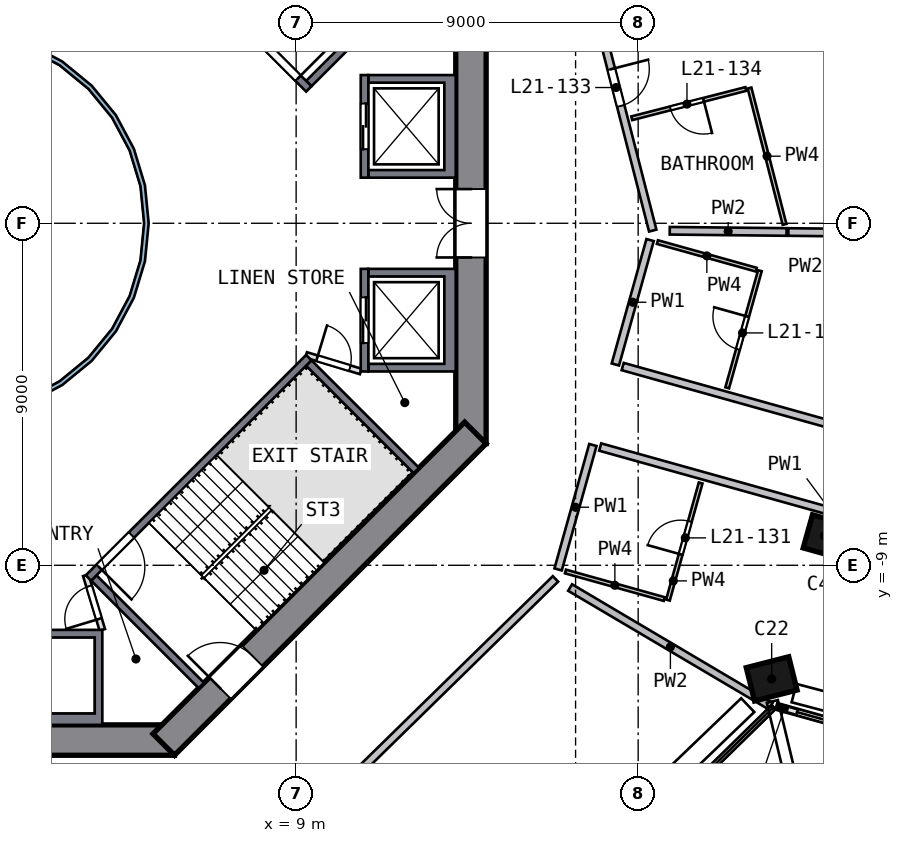
"""IFC4 building model, lengths in metres.
Left out: names, types, materials, properties, quantities, classifications, styles, units other than length and angle.
Written with IfcOpenShell. Run it as: python <this file> out.ifc"""

import sys

from ifc_helpers import new_model, si_unit, direction, frame, frame_2d, origin, origin_2d, place, context, subcontext, project, spatial, polyline, rectangle, outline, extrude, element, fill, save


model = new_model("IFC4")
c1 = context("Model", 3, precision=1e-05, world=origin(), true_north=direction((0.0, 1.0)))
c2 = subcontext(c1, "Body", "Model", "MODEL_VIEW")
j1 = project(units=[si_unit("LENGTHUNIT", "METRE"), si_unit("PLANEANGLEUNIT", "RADIAN")], contexts=[c1])
p1 = place(None, origin())
s1 = spatial("IfcSite", under=j1, at=p1, CompositionType="ELEMENT")
p2 = place(p1, origin())
s2 = spatial("IfcBuilding", under=s1, at=p2, CompositionType="ELEMENT")
p3 = place(p2, frame((0.0, 0.0, 93.0)))
s3 = spatial("IfcBuildingStorey", under=s2, at=p3, CompositionType="ELEMENT", Elevation=93.0)
p4 = place(p3, frame((21.444, -12.113, 0.0), z_axis=(0.056777694, 0.102458276, 0.9931156), x_axis=(-0.96720596, -0.24101204, 0.080161264)))
e1 = element("IfcColumn", 1, at=p4, inside=s3, PredefinedType="COLUMN", context=c2, shape_type="SweptSolid", body=[
    extrude(rectangle(XDim=1.15, YDim=0.9, at=origin_2d()), origin(), (0.0, 0.0, 1.0), 3.212),
])
p5 = place(p3, frame((22.852, -8.36, 0.0), z_axis=(0.038846363, 0.109013082, 0.993280981), x_axis=(0.962880734, -0.269807256, -0.008045955)))
e2 = element("IfcColumn", 2, at=p5, inside=s3, PredefinedType="COLUMN", context=c2, shape_type="SweptSolid", body=[
    extrude(rectangle(XDim=0.9, YDim=0.9, at=origin_2d()), origin(), (0.0, 0.0, 1.0), 3.211),
])
p6 = place(p3, frame((13.6, -5.799, 0.0), z_axis=(0.0, 0.0, 1.0), x_axis=(0.0, 1.0, 0.0)))
e3 = element("IfcWall", 3, at=p6, inside=s3, PredefinedType="SHEAR", context=c2, shape_type="SweptSolid", body=[
    extrude(rectangle(XDim=11.598, YDim=0.8, at=frame_2d((5.799, 0.0))), origin(), (0.0, 0.0, 1.0), 3.5),
])
p7 = place(p6, frame((4.899, 0.0, 0.0)))
e4 = element("IfcOpeningElement", 4, at=p7, cuts=e3, PredefinedType="OPENING", context=c2, shape_type="SweptSolid", body=[
    extrude(rectangle(XDim=1.8, YDim=2.1, at=frame_2d((0.9, 1.05))), frame((0.0, 0.41, 0.0), z_axis=(0.0, -1.0, 0.0), x_axis=(1.0, 0.0, 0.0)), (0.0, 0.0, 1.0), 0.82),
])
p8 = place(p3, frame((-5.799, -13.6, 0.0), z_axis=(0.0, 0.0, 1.0), x_axis=(1.0, 0.0, 0.0)))
e5 = element("IfcWall", 5, at=p8, inside=s3, PredefinedType="SHEAR", context=c2, shape_type="SweptSolid", body=[
    extrude(rectangle(XDim=11.598, YDim=0.8, at=frame_2d((5.799, 0.0))), origin(), (0.0, 0.0, 1.0), 3.5),
])
p9 = place(p8, frame((4.899, 0.0, 0.0)))
e6 = element("IfcOpeningElement", 6, at=p9, cuts=e5, PredefinedType="OPENING", context=c2, shape_type="SweptSolid", body=[
    extrude(rectangle(XDim=1.8, YDim=2.1, at=frame_2d((0.9, 1.05))), frame((0.0, 0.41, 0.0), z_axis=(0.0, -1.0, 0.0), x_axis=(1.0, 0.0, 0.0)), (0.0, 0.0, 1.0), 0.82),
])
p10 = place(p3, frame((5.516, -13.717, 0.0), z_axis=(0.0, 0.0, 1.0), x_axis=(0.707106781, 0.707106781, 0.0)))
e7 = element("IfcWall", 7, at=p10, inside=s3, PredefinedType="SHEAR", context=c2, shape_type="SweptSolid", body=[
    extrude(rectangle(XDim=11.598, YDim=0.8, at=frame_2d((5.799, 0.0))), origin(), (0.0, 0.0, 1.0), 3.5),
])
p11 = place(p10, frame((2.099, 0.0, 0.0)))
e8 = element("IfcOpeningElement", 8, at=p11, cuts=e7, PredefinedType="OPENING", context=c2, shape_type="SweptSolid", body=[
    extrude(rectangle(XDim=1.2, YDim=2.1, at=frame_2d((0.6, 1.05))), frame((0.0, 0.41, 0.0), z_axis=(0.0, -1.0, 0.0), x_axis=(1.0, 0.0, 0.0)), (0.0, 0.0, 1.0), 0.82),
])
p12 = place(p3, frame((21.704, -12.731, 0.0), z_axis=(0.0, 0.0, 1.0), x_axis=(0.963162375, -0.268920509, 0.0)))
e9 = element("IfcWall", 9, at=p12, inside=s3, PredefinedType="SOLIDWALL", context=c2, shape_type="SweptSolid", body=[
    extrude(rectangle(XDim=3.294, YDim=0.15, at=frame_2d((1.647, 0.0))), origin(), (0.0, 0.0, 1.0), 2.425),
])
p13 = place(p12, frame((0.494, 0.0, 0.0)))
e10 = element("IfcOpeningElement", 10, at=p13, cuts=e9, PredefinedType="OPENING", context=c2, shape_type="SweptSolid", body=[
    extrude(rectangle(XDim=2.4, YDim=2.4, at=frame_2d((1.2, 1.2))), frame((0.0, 0.085, 0.0), z_axis=(0.0, -1.0, 0.0), x_axis=(1.0, 0.0, 0.0)), (0.0, 0.0, 1.0), 0.17),
])
p14 = place(p3, origin())
e11 = element("IfcWall", 11, at=p14, inside=s3, PredefinedType="SOLIDWALL", context=c2, shape_type="SweptSolid", body=[
    extrude(outline(polyline([(13.2, -3.9), (10.9, -3.9), (10.9, -3.7), (12.9, -3.7), (12.9, -1.4), (10.9, -1.4), (10.9, -1.2), (13.2, -1.2), (13.2, -3.9)])), origin(), (0.0, 0.0, 1.0), 3.19),
])
p15 = place(p3, frame((10.8, -1.2, 0.0), z_axis=(0.0, 0.0, 1.0), x_axis=(0.0, -1.0, 0.0)))
e12 = element("IfcWall", 12, at=p15, inside=s3, PredefinedType="SOLIDWALL", context=c2, shape_type="SweptSolid", body=[
    extrude(rectangle(XDim=2.7, YDim=0.2, at=frame_2d((1.35, 0.0))), origin(), (0.0, 0.0, 1.0), 3.19),
])
p16 = place(p15, frame((0.75, 0.0, 0.0)))
e13 = element("IfcOpeningElement", 13, at=p16, cuts=e12, PredefinedType="OPENING", context=c2, shape_type="SweptSolid", body=[
    extrude(rectangle(XDim=1.2, YDim=2.1, at=frame_2d((0.6, 1.05))), frame((0.0, 0.11, 0.0), z_axis=(0.0, -1.0, 0.0), x_axis=(1.0, 0.0, 0.0)), (0.0, 0.0, 1.0), 0.22),
])
p17 = place(p3, origin())
e14 = element("IfcWall", 14, at=p17, inside=s3, PredefinedType="SOLIDWALL", context=c2, shape_type="SweptSolid", body=[
    extrude(outline(polyline([(13.2, 3.9), (13.2, 1.2), (10.9, 1.2), (10.9, 1.4), (12.9, 1.4), (12.9, 3.7), (10.9, 3.7), (10.9, 3.9), (13.2, 3.9)])), origin(), (0.0, 0.0, 1.0), 3.19),
])
p18 = place(p3, frame((10.8, 1.2, 0.0), z_axis=(0.0, 0.0, 1.0), x_axis=(0.0, 1.0, 0.0)))
e15 = element("IfcWall", 15, at=p18, inside=s3, PredefinedType="SOLIDWALL", context=c2, shape_type="SweptSolid", body=[
    extrude(rectangle(XDim=2.7, YDim=0.2, at=frame_2d((1.35, 0.0))), origin(), (0.0, 0.0, 1.0), 3.19),
])
p19 = place(p18, frame((0.75, 0.0, 0.0)))
e16 = element("IfcOpeningElement", 16, at=p19, cuts=e15, PredefinedType="OPENING", context=c2, shape_type="SweptSolid", body=[
    extrude(rectangle(XDim=1.2, YDim=2.1, at=frame_2d((0.6, 1.05))), frame((0.0, 0.11, 0.0), z_axis=(0.0, -1.0, 0.0), x_axis=(1.0, 0.0, 0.0)), (0.0, 0.0, 1.0), 0.22),
])
p20 = place(p3, origin())
e17 = element("IfcWall", 17, at=p20, inside=s3, PredefinedType="SOLIDWALL", context=c2, shape_type="SweptSolid", body=[
    extrude(outline(polyline([(3.9, -10.7), (3.9, -13.2), (1.2, -13.2), (1.2, -10.7), (3.9, -10.7)]), holes=[polyline([(1.4, -12.9), (3.7, -12.9), (3.7, -10.9), (1.4, -10.9), (1.4, -12.9)])]), origin(), (0.0, 0.0, 1.0), 3.19),
])
p21 = place(p3, frame((3.535, 9.334, 0.0), z_axis=(0.0, 0.0, 1.0), x_axis=(0.707106781, -0.707106781, 0.0)))
e18 = element("IfcWall", 18, at=p21, inside=s3, PredefinedType="SOLIDWALL", context=c2, shape_type="SweptSolid", body=[
    extrude(rectangle(XDim=8.2, YDim=0.2, at=frame_2d((4.1, 0.0))), origin(), (0.0, 0.0, 1.0), 3.19),
])
p22 = place(p21, frame((6.6, 0.0, 0.0)))
e19 = element("IfcOpeningElement", 19, at=p22, cuts=e18, PredefinedType="OPENING", context=c2, shape_type="SweptSolid", body=[
    extrude(rectangle(XDim=1.2, YDim=2.1, at=frame_2d((0.6, 1.05))), frame((0.0, 0.11, 0.0), z_axis=(0.0, -1.0, 0.0), x_axis=(1.0, 0.0, 0.0)), (0.0, 0.0, 1.0), 0.22),
])
p23 = place(p3, frame((9.334, 3.677, 0.0), z_axis=(0.0, 0.0, 1.0), x_axis=(0.707106781, 0.707106781, 0.0)))
e20 = element("IfcWall", 20, at=p23, inside=s3, PredefinedType="SOLIDWALL", context=c2, shape_type="SweptSolid", body=[
    extrude(rectangle(XDim=4.0, YDim=0.2, at=frame_2d((2.0, 0.0))), origin(), (0.0, 0.0, 1.0), 3.19),
])
p24 = place(p3, frame((9.334, -3.535, 0.0), z_axis=(0.0, 0.0, 1.0), x_axis=(-0.707106781, -0.707106781, 0.0)))
e21 = element("IfcWall", 21, at=p24, inside=s3, PredefinedType="SOLIDWALL", context=c2, shape_type="SweptSolid", body=[
    extrude(rectangle(XDim=8.2, YDim=0.2, at=frame_2d((4.1, 0.0))), origin(), (0.0, 0.0, 1.0), 3.19),
])
p25 = place(p24, frame((6.6, 0.0, 0.0)))
e22 = element("IfcOpeningElement", 22, at=p25, cuts=e21, PredefinedType="OPENING", context=c2, shape_type="SweptSolid", body=[
    extrude(rectangle(XDim=1.2, YDim=2.1, at=frame_2d((0.6, 1.05))), frame((0.0, 0.11, 0.0), z_axis=(0.0, -1.0, 0.0), x_axis=(1.0, 0.0, 0.0)), (0.0, 0.0, 1.0), 0.22),
])
for number, where, z_axis, x_axis in (
    (23, (3.677, -9.334, 0.0), (0.0, 0.0, 1.0), (0.707, -0.707, 0.0)),
    (24, (9.334, -3.677, 0.0), (0.0, 0.0, 1.0), (0.707, -0.707, 0.0)),
):
    element("IfcWall", number, at=place(p3, frame(where, z_axis=z_axis, x_axis=x_axis)), inside=s3, PredefinedType="SOLIDWALL", context=c2, shape_type="SweptSolid", body=[
        extrude(rectangle(XDim=4.0, YDim=0.2, at=frame_2d((2.0, 0.0))), origin(), (0.0, 0.0, 1.0), 3.19),
    ])
p26 = place(p3, frame((3.9, -10.7, 0.0), z_axis=(0.0, 0.0, 1.0), x_axis=(-0.289808785, 0.957084567, 0.0)))
e25 = element("IfcWall", 25, at=p26, inside=s3, PredefinedType="PARTITIONING", context=c2, shape_type="SweptSolid", body=[
    extrude(rectangle(XDim=1.501, YDim=0.15, at=frame_2d((0.75, 0.0))), origin(), (0.0, 0.0, 1.0), 3.19),
])
p27 = place(p26, frame((0.301, 0.0, 0.0)))
e26 = element("IfcOpeningElement", 26, at=p27, cuts=e25, PredefinedType="OPENING", context=c2, shape_type="SweptSolid", body=[
    extrude(rectangle(XDim=0.9, YDim=2.1, at=frame_2d((0.45, 1.05))), frame((0.0, 0.085, 0.0), z_axis=(0.0, -1.0, 0.0), x_axis=(1.0, 0.0, 0.0)), (0.0, 0.0, 1.0), 0.17),
])
p28 = place(p3, frame((9.263, -3.465, 0.0), z_axis=(0.0, 0.0, 1.0), x_axis=(0.957084567, -0.289808785, 0.0)))
e27 = element("IfcWall", 27, at=p28, inside=s3, PredefinedType="PARTITIONING", context=c2, shape_type="SweptSolid", body=[
    extrude(rectangle(XDim=1.501, YDim=0.15, at=frame_2d((0.75, 0.0))), origin(), (0.0, 0.0, 1.0), 3.19),
])
p29 = place(p28, frame((0.301, 0.0, 0.0)))
e28 = element("IfcOpeningElement", 28, at=p29, cuts=e27, PredefinedType="OPENING", context=c2, shape_type="SweptSolid", body=[
    extrude(rectangle(XDim=0.9, YDim=2.1, at=frame_2d((0.45, 1.05))), frame((0.0, 0.085, 0.0), z_axis=(0.0, -1.0, 0.0), x_axis=(1.0, 0.0, 0.0)), (0.0, 0.0, 1.0), 0.17),
])
p30 = place(p3, origin())
e29 = element("IfcWall", 29, at=p30, inside=s3, PredefinedType="SOLIDWALL", context=c2, shape_type="SweptSolid", body=[
    extrude(outline(polyline([(5.021, -0.999), (4.73, -1.959), (4.257, -2.844), (3.62, -3.62), (2.844, -4.257), (1.959, -4.73), (0.999, -5.021), (0.0, -5.12), (-0.999, -5.021), (-1.959, -4.73), (-2.844, -4.257), (-3.62, -3.62), (-4.257, -2.844), (-4.73, -1.959), (-5.021, -0.999), (-5.12, 0.0), (-5.021, 0.999), (-4.73, 1.959), (-4.257, 2.844), (-3.62, 3.62), (-2.844, 4.257), (-1.959, 4.73), (-0.999, 5.021), (0.0, 5.12), (0.999, 5.021), (1.959, 4.73), (2.844, 4.257), (3.62, 3.62), (4.257, 2.844), (4.73, 1.959), (5.021, 0.999), (5.12, 0.0), (5.021, -0.999)]), holes=[polyline([(4.904, 0.976), (4.619, 1.913), (4.157, 2.778), (3.535, 3.535), (2.778, 4.157), (1.913, 4.619), (0.976, 4.904), (0.0, 5.0), (-0.976, 4.904), (-1.913, 4.619), (-2.778, 4.157), (-3.535, 3.535), (-4.157, 2.778), (-4.619, 1.913), (-4.904, 0.976), (-5.0, 0.0), (-4.904, -0.976), (-4.619, -1.913), (-4.157, -2.778), (-3.535, -3.535), (-2.778, -4.157), (-1.913, -4.619), (-0.976, -4.904), (0.0, -5.0), (0.976, -4.904), (1.913, -4.619), (2.778, -4.157), (3.535, -3.535), (4.157, -2.778), (4.619, -1.913), (4.904, -0.976), (5.0, 0.0), (4.904, 0.976)])]), origin(), (0.0, 0.0, 1.0), 3.19),
])
p31 = place(p3, frame((9.025, -16.017, 0.0), z_axis=(0.0, 0.0, 1.0), x_axis=(0.714482371, 0.699653444, 0.0)))
e30 = element("IfcWall", 30, at=p31, inside=s3, PredefinedType="SOLIDWALL", context=c2, shape_type="SweptSolid", body=[
    extrude(rectangle(XDim=9.516, YDim=0.2, at=frame_2d((4.758, 0.0))), origin(), (0.0, 0.0, 1.0), 3.19),
])
p32 = place(p3, frame((15.894, -9.11, 0.0), z_axis=(0.0, 0.0, 1.0), x_axis=(0.268902762, 0.963167329, 0.0)))
e31 = element("IfcWall", 31, at=p32, inside=s3, PredefinedType="SOLIDWALL", context=c2, shape_type="SweptSolid", body=[
    extrude(rectangle(XDim=3.4, YDim=0.2, at=frame_2d((1.7, 0.0))), origin(), (0.0, 0.0, 1.0), 3.19),
])
p33 = place(p3, frame((16.012, 9.044, 0.0), z_axis=(0.0, 0.0, 1.0), x_axis=(0.248687002, -0.968583902, 0.0)))
e32 = element("IfcWall", 32, at=p33, inside=s3, PredefinedType="SOLIDWALL", context=c2, shape_type="SweptSolid", body=[
    extrude(rectangle(XDim=9.536, YDim=0.2, at=frame_2d((4.768, 0.0))), origin(), (0.0, 0.0, 1.0), 3.19),
])
p34 = place(p33, frame((5.15, 0.0, 0.0)))
e33 = element("IfcOpeningElement", 33, at=p34, cuts=e32, PredefinedType="OPENING", context=c2, shape_type="SweptSolid", body=[
    extrude(rectangle(XDim=1.0, YDim=2.1, at=frame_2d((0.5, 1.05))), frame((0.0, 0.11, 0.0), z_axis=(0.0, -1.0, 0.0), x_axis=(1.0, 0.0, 0.0)), (0.0, 0.0, 1.0), 0.22),
])
p35 = place(p3, frame((17.4, -3.716, 0.0), z_axis=(0.0, 0.0, 1.0), x_axis=(0.26892136, 0.963162137, 0.0)))
e34 = element("IfcWall", 34, at=p35, inside=s3, PredefinedType="SOLIDWALL", context=c2, shape_type="SweptSolid", body=[
    extrude(rectangle(XDim=3.4, YDim=0.2, at=frame_2d((1.7, 0.0))), origin(), (0.0, 0.0, 1.0), 3.19),
])
p36 = place(p3, frame((17.001, -5.889, 0.0), z_axis=(0.0, 0.0, 1.0), x_axis=(0.963163806, -0.268915381, 0.0)))
e35 = element("IfcWall", 35, at=p36, inside=s3, PredefinedType="SOLIDWALL", context=c2, shape_type="SweptSolid", body=[
    extrude(rectangle(XDim=12.624, YDim=0.2, at=frame_2d((6.312, 0.0))), origin(), (0.0, 0.0, 1.0), 3.19),
])
p37 = place(p3, frame((29.752, -7.165, 0.0), z_axis=(0.0, 0.0, 1.0), x_axis=(-0.963165205, 0.268910372, 0.0)))
e36 = element("IfcWall", 36, at=p37, inside=s3, PredefinedType="SOLIDWALL", context=c2, shape_type="SweptSolid", body=[
    extrude(rectangle(XDim=12.624, YDim=0.2, at=frame_2d((6.312, 0.0))), origin(), (0.0, 0.0, 1.0), 3.19),
])
p38 = place(p3, frame((16.209, -9.586, 0.0), z_axis=(0.0, 0.0, 1.0), x_axis=(0.860732275, -0.509057906, 0.0)))
e37 = element("IfcWall", 37, at=p38, inside=s3, PredefinedType="SOLIDWALL", context=c2, shape_type="SweptSolid", body=[
    extrude(rectangle(XDim=6.132, YDim=0.2, at=frame_2d((3.066, 0.0))), origin(), (0.0, 0.0, 1.0), 3.19),
])
p39 = place(p3, frame((18.831, -0.197, 0.0), z_axis=(0.0, 0.0, 1.0), x_axis=(0.999945068, -0.010481438, 0.0)))
e38 = element("IfcWall", 38, at=p39, inside=s3, PredefinedType="SOLIDWALL", context=c2, shape_type="SweptSolid", body=[
    extrude(rectangle(XDim=3.075, YDim=0.2, at=frame_2d((1.537, 0.0))), origin(), (0.0, 0.0, 1.0), 3.19),
])
p40 = place(p3, frame((21.951, -0.23, 0.0), z_axis=(0.0, 0.0, 1.0), x_axis=(0.99994531, -0.010458322, 0.0)))
e39 = element("IfcWall", 39, at=p40, inside=s3, PredefinedType="SOLIDWALL", context=c2, shape_type="SweptSolid", body=[
    extrude(rectangle(XDim=3.011, YDim=0.2, at=frame_2d((1.506, 0.0))), origin(), (0.0, 0.0, 1.0), 2.69),
])
p41 = place(p3, frame((16.087, -9.164, 0.0), z_axis=(0.0, 0.0, 1.0), x_axis=(0.963164718, -0.268912117, 0.0)))
e40 = element("IfcWall", 40, at=p41, inside=s3, PredefinedType="PARTITIONING", context=c2, shape_type="SweptSolid", body=[
    extrude(rectangle(XDim=2.7, YDim=0.1, at=frame_2d((1.35, 0.0))), origin(), (0.0, 0.0, 1.0), 3.19),
])
p42 = place(p3, frame((18.783, -9.917, 0.0), z_axis=(0.0, 0.0, 1.0), x_axis=(0.268942177, 0.963156324, 0.0)))
e41 = element("IfcWall", 41, at=p42, inside=s3, PredefinedType="PARTITIONING", context=c2, shape_type="SweptSolid", body=[
    extrude(rectangle(XDim=3.2, YDim=0.1, at=frame_2d((1.6, 0.0))), origin(), (0.0, 0.0, 1.0), 3.19),
])
p43 = place(p42, frame((1.25, 0.0, 0.0)))
e42 = element("IfcOpeningElement", 42, at=p43, cuts=e41, PredefinedType="OPENING", context=c2, shape_type="SweptSolid", body=[
    extrude(rectangle(XDim=0.9, YDim=2.1, at=frame_2d((0.45, 1.05))), frame((0.0, 0.06, 0.0), z_axis=(0.0, -1.0, 0.0), x_axis=(1.0, 0.0, 0.0)), (0.0, 0.0, 1.0), 0.12),
])
p44 = place(p3, frame((20.834, 3.534, 0.0), z_axis=(0.0, 0.0, 1.0), x_axis=(-0.968580249, -0.24870123, 0.0)))
e43 = element("IfcWall", 43, at=p44, inside=s3, PredefinedType="PARTITIONING", context=c2, shape_type="SweptSolid", body=[
    extrude(rectangle(XDim=3.1, YDim=0.1, at=frame_2d((1.55, 0.0))), origin(), (0.0, 0.0, 1.0), 3.19),
])
p45 = place(p44, frame((1.15, 0.0, 0.0)))
e44 = element("IfcOpeningElement", 44, at=p45, cuts=e43, PredefinedType="OPENING", context=c2, shape_type="SweptSolid", body=[
    extrude(rectangle(XDim=0.9, YDim=2.1, at=frame_2d((0.45, 1.05))), frame((0.0, 0.06, 0.0), z_axis=(0.0, -1.0, 0.0), x_axis=(1.0, 0.0, 0.0)), (0.0, 0.0, 1.0), 0.12),
])
p46 = place(p3, frame((21.107, -1.221, 0.0), z_axis=(0.0, 0.0, 1.0), x_axis=(-0.963164718, 0.268912117, 0.0)))
e45 = element("IfcWall", 45, at=p46, inside=s3, PredefinedType="PARTITIONING", context=c2, shape_type="SweptSolid", body=[
    extrude(rectangle(XDim=2.7, YDim=0.1, at=frame_2d((1.35, 0.0))), origin(), (0.0, 0.0, 1.0), 3.19),
])
p47 = place(p3, frame((20.343, -4.33, 0.0), z_axis=(0.0, 0.0, 1.0), x_axis=(0.268942177, 0.963156324, 0.0)))
e46 = element("IfcWall", 46, at=p47, inside=s3, PredefinedType="PARTITIONING", context=c2, shape_type="SweptSolid", body=[
    extrude(rectangle(XDim=3.2, YDim=0.1, at=frame_2d((1.6, 0.0))), origin(), (0.0, 0.0, 1.0), 3.19),
])
p48 = place(p47, frame((1.05, 0.0, 0.0)))
e47 = element("IfcOpeningElement", 47, at=p48, cuts=e46, PredefinedType="OPENING", context=c2, shape_type="SweptSolid", body=[
    extrude(rectangle(XDim=0.9, YDim=2.1, at=frame_2d((0.45, 1.05))), frame((0.0, 0.06, 0.0), z_axis=(0.0, -1.0, 0.0), x_axis=(1.0, 0.0, 0.0)), (0.0, 0.0, 1.0), 0.12),
])
p49 = place(p3, frame((20.931, 3.559, 0.0), z_axis=(0.0, 0.0, 1.0), x_axis=(0.24868774, -0.968583712, 0.0)))
e48 = element("IfcWall", 48, at=p49, inside=s3, PredefinedType="PARTITIONING", context=c2, shape_type="SweptSolid", body=[
    extrude(rectangle(XDim=3.704, YDim=0.1, at=frame_2d((1.852, 0.0))), origin(), (0.0, 0.0, 1.0), 3.19),
])
p50 = place(p13, origin())
e49 = element("IfcDoor", 49, at=p50, inside=s3, OperationType="SLIDING_TO_LEFT", PredefinedType="DOOR", context=c2, shape_type="SweptSolid", body=[
    extrude(rectangle(XDim=2.4, YDim=2.4, at=frame_2d((1.2, 1.2))), frame((0.0, 0.025, 0.0), z_axis=(0.0, -1.0, 0.0), x_axis=(1.0, 0.0, 0.0)), (0.0, 0.0, 1.0), 0.05),
])
fill(e10, e49)
p51 = place(p16, origin())
e50 = element("IfcDoor", 50, at=p51, inside=s3, OperationType="DOUBLE_DOOR_SLIDING", PredefinedType="DOOR", context=c2, shape_type="SweptSolid", body=[
    extrude(rectangle(XDim=1.2, YDim=2.1, at=frame_2d((0.6, 1.05))), frame((0.0, 0.025, 0.0), z_axis=(0.0, -1.0, 0.0), x_axis=(1.0, 0.0, 0.0)), (0.0, 0.0, 1.0), 0.05),
])
fill(e13, e50)
p52 = place(p19, origin())
e51 = element("IfcDoor", 51, at=p52, inside=s3, OperationType="DOUBLE_DOOR_SLIDING", PredefinedType="DOOR", context=c2, shape_type="SweptSolid", body=[
    extrude(rectangle(XDim=1.2, YDim=2.1, at=frame_2d((0.6, 1.05))), frame((0.0, 0.025, 0.0), z_axis=(0.0, -1.0, 0.0), x_axis=(1.0, 0.0, 0.0)), (0.0, 0.0, 1.0), 0.05),
])
fill(e16, e51)
p53 = place(p22, origin())
e52 = element("IfcDoor", 52, at=p53, inside=s3, OperationType="SINGLE_SWING_RIGHT", PredefinedType="DOOR", context=c2, shape_type="SweptSolid", body=[
    extrude(rectangle(XDim=1.2, YDim=2.1, at=frame_2d((0.6, 1.05))), frame((0.0, 0.025, 0.0), z_axis=(0.0, -1.0, 0.0), x_axis=(1.0, 0.0, 0.0)), (0.0, 0.0, 1.0), 0.05),
])
fill(e19, e52)
p54 = place(p25, origin())
e53 = element("IfcDoor", 53, at=p54, inside=s3, OperationType="SINGLE_SWING_RIGHT", PredefinedType="DOOR", context=c2, shape_type="SweptSolid", body=[
    extrude(rectangle(XDim=1.2, YDim=2.1, at=frame_2d((0.6, 1.05))), frame((0.0, 0.025, 0.0), z_axis=(0.0, -1.0, 0.0), x_axis=(1.0, 0.0, 0.0)), (0.0, 0.0, 1.0), 0.05),
])
fill(e22, e53)
p55 = place(p7, origin())
e54 = element("IfcDoor", 54, at=p55, inside=s3, OperationType="DOUBLE_DOOR_SINGLE_SWING", PredefinedType="DOOR", context=c2, shape_type="SweptSolid", body=[
    extrude(rectangle(XDim=1.8, YDim=2.1, at=frame_2d((0.9, 1.05))), frame((0.0, 0.025, 0.0), z_axis=(0.0, -1.0, 0.0), x_axis=(1.0, 0.0, 0.0)), (0.0, 0.0, 1.0), 0.05),
])
fill(e4, e54)
p56 = place(p11, origin())
e55 = element("IfcDoor", 55, at=p56, inside=s3, OperationType="SINGLE_SWING_LEFT", PredefinedType="DOOR", context=c2, shape_type="SweptSolid", body=[
    extrude(rectangle(XDim=1.2, YDim=2.1, at=frame_2d((0.6, 1.05))), frame((0.0, 0.025, 0.0), z_axis=(0.0, -1.0, 0.0), x_axis=(1.0, 0.0, 0.0)), (0.0, 0.0, 1.0), 0.05),
])
fill(e8, e55)
p57 = place(p27, origin())
e56 = element("IfcDoor", 56, at=p57, inside=s3, OperationType="SINGLE_SWING_LEFT", PredefinedType="DOOR", context=c2, shape_type="SweptSolid", body=[
    extrude(rectangle(XDim=0.9, YDim=2.1, at=frame_2d((0.45, 1.05))), frame((0.0, 0.025, 0.0), z_axis=(0.0, -1.0, 0.0), x_axis=(1.0, 0.0, 0.0)), (0.0, 0.0, 1.0), 0.05),
])
fill(e26, e56)
p58 = place(p29, origin())
e57 = element("IfcDoor", 57, at=p58, inside=s3, OperationType="SINGLE_SWING_LEFT", PredefinedType="DOOR", context=c2, shape_type="SweptSolid", body=[
    extrude(rectangle(XDim=0.9, YDim=2.1, at=frame_2d((0.45, 1.05))), frame((0.0, 0.025, 0.0), z_axis=(0.0, -1.0, 0.0), x_axis=(1.0, 0.0, 0.0)), (0.0, 0.0, 1.0), 0.05),
])
fill(e28, e57)
p59 = place(p43, origin())
e58 = element("IfcDoor", 58, at=p59, inside=s3, OperationType="SINGLE_SWING_LEFT", PredefinedType="DOOR", context=c2, shape_type="SweptSolid", body=[
    extrude(rectangle(XDim=0.9, YDim=2.1, at=frame_2d((0.45, 1.05))), frame((0.0, 0.025, 0.0), z_axis=(0.0, -1.0, 0.0), x_axis=(1.0, 0.0, 0.0)), (0.0, 0.0, 1.0), 0.05),
])
fill(e42, e58)
p60 = place(p48, origin())
e59 = element("IfcDoor", 59, at=p60, inside=s3, OperationType="SINGLE_SWING_RIGHT", PredefinedType="DOOR", context=c2, shape_type="SweptSolid", body=[
    extrude(rectangle(XDim=0.9, YDim=2.1, at=frame_2d((0.45, 1.05))), frame((0.0, 0.025, 0.0), z_axis=(0.0, -1.0, 0.0), x_axis=(1.0, 0.0, 0.0)), (0.0, 0.0, 1.0), 0.05),
])
fill(e47, e59)
p61 = place(p34, origin())
e60 = element("IfcDoor", 60, at=p61, inside=s3, OperationType="SINGLE_SWING_LEFT", PredefinedType="DOOR", context=c2, shape_type="SweptSolid", body=[
    extrude(rectangle(XDim=1.0, YDim=2.1, at=frame_2d((0.5, 1.05))), frame((0.0, 0.025, 0.0), z_axis=(0.0, -1.0, 0.0), x_axis=(1.0, 0.0, 0.0)), (0.0, 0.0, 1.0), 0.05),
])
fill(e33, e60)
p62 = place(p45, origin())
e61 = element("IfcDoor", 61, at=p62, inside=s3, OperationType="SINGLE_SWING_LEFT", PredefinedType="DOOR", context=c2, shape_type="SweptSolid", body=[
    extrude(rectangle(XDim=0.9, YDim=2.1, at=frame_2d((0.45, 1.05))), frame((0.0, 0.025, 0.0), z_axis=(0.0, -1.0, 0.0), x_axis=(1.0, 0.0, 0.0)), (0.0, 0.0, 1.0), 0.05),
])
fill(e44, e61)
save(model, sys.argv[1])
